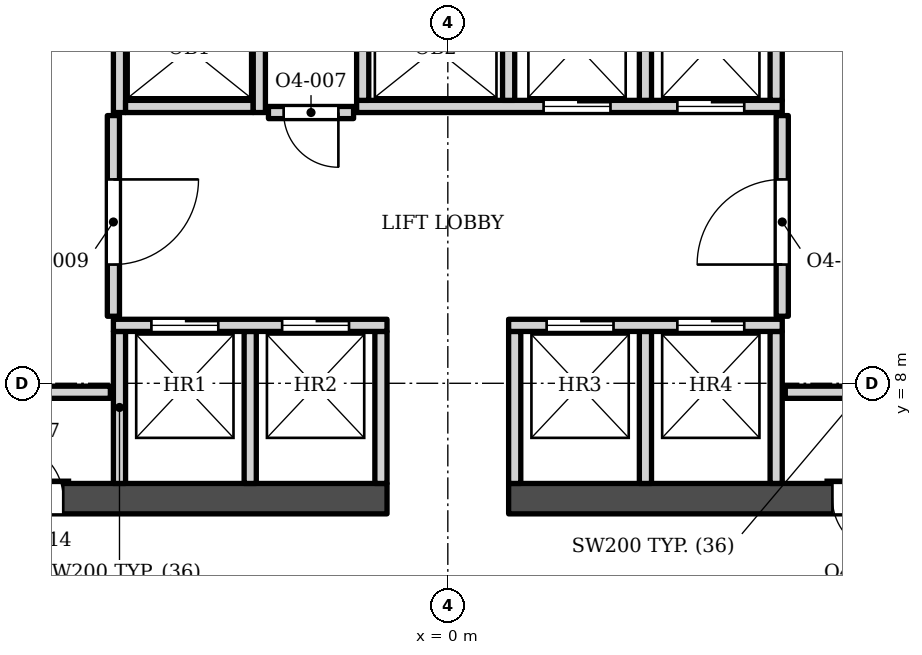
"""IFC4 building model, lengths in metres.
Left out: names, types, materials, properties, quantities, classifications, styles, units other than length and angle.
Written with IfcOpenShell. Run it as: python <this file> out.ifc"""

import sys

from ifc_helpers import new_model, si_unit, direction, frame, frame_2d, origin, place, context, subcontext, project, spatial, rectangle, extrude, element, fill, save


model = new_model("IFC4")
c1 = context("Model", 3, precision=1e-05, world=origin(), true_north=direction((0.0, 1.0)))
c2 = subcontext(c1, "Body", "Model", "MODEL_VIEW")
j1 = project(units=[si_unit("LENGTHUNIT", "METRE"), si_unit("PLANEANGLEUNIT", "RADIAN")], contexts=[c1])
p1 = place(None, origin())
s1 = spatial("IfcSite", under=j1, at=p1, CompositionType="ELEMENT")
p2 = place(p1, origin())
s2 = spatial("IfcBuilding", under=s1, at=p2, CompositionType="ELEMENT")
p3 = place(p2, frame((0.0, 0.0, 179.7)))
s3 = spatial("IfcBuildingStorey", under=s2, at=p3, CompositionType="ELEMENT", Elevation=179.7)
p4 = place(p3, frame((-8.05, 6.103, 0.0), z_axis=(0.0, 0.0, 1.0), x_axis=(1.0, 0.0, 0.0)))
e1 = element("IfcWall", 1, at=p4, inside=s3, PredefinedType="SHEAR", context=c2, shape_type="SweptSolid", body=[
    extrude(rectangle(XDim=7.05, YDim=0.5, at=frame_2d((3.525, 0.0))), origin(), (0.0, 0.0, 1.0), 3.9),
])
p5 = place(p4, frame((0.825, 0.0, 0.0)))
e2 = element("IfcOpeningElement", 2, at=p5, cuts=e1, PredefinedType="OPENING", context=c2, shape_type="SweptSolid", body=[
    extrude(rectangle(XDim=0.9, YDim=2.1, at=frame_2d((0.45, 1.05))), frame((0.0, 0.26, 0.0), z_axis=(0.0, -1.0, 0.0), x_axis=(1.0, 0.0, 0.0)), (0.0, 0.0, 1.0), 0.52),
])
p6 = place(p3, frame((1.0, 6.103, 0.0), z_axis=(0.0, 0.0, 1.0), x_axis=(1.0, 0.0, 0.0)))
e3 = element("IfcWall", 3, at=p6, inside=s3, PredefinedType="SHEAR", context=c2, shape_type="SweptSolid", body=[
    extrude(rectangle(XDim=7.05, YDim=0.5, at=frame_2d((3.525, 0.0))), origin(), (0.0, 0.0, 1.0), 3.9),
])
p7 = place(p6, frame((5.325, 0.0, 0.0)))
e4 = element("IfcOpeningElement", 4, at=p7, cuts=e3, PredefinedType="OPENING", context=c2, shape_type="SweptSolid", body=[
    extrude(rectangle(XDim=0.9, YDim=2.1, at=frame_2d((0.45, 1.05))), frame((0.0, 0.26, 0.0), z_axis=(0.0, -1.0, 0.0), x_axis=(1.0, 0.0, 0.0)), (0.0, 0.0, 1.0), 0.52),
])
for number, where, z_axis, x_axis in (
    (5, (-5.4, 6.353, 0.0), (0.0, 0.0, 1.0), (0.0, 1.0, 0.0)),
    (6, (-3.25, 6.353, 0.0), (0.0, 0.0, 1.0), (0.0, 1.0, 0.0)),
    (7, (-1.1, 6.353, 0.0), (0.0, 0.0, 1.0), (0.0, 1.0, 0.0)),
    (8, (1.1, 6.353, 0.0), (0.0, 0.0, 1.0), (0.0, 1.0, 0.0)),
    (9, (3.25, 6.353, 0.0), (0.0, 0.0, 1.0), (0.0, 1.0, 0.0)),
    (10, (5.4, 6.353, 0.0), (0.0, 0.0, 1.0), (0.0, 1.0, 0.0)),
    (11, (-8.05, 7.853, 0.0), (0.0, 0.0, 1.0), (1.0, 0.0, 0.0)),
    (12, (5.55, 7.853, 0.0), (0.0, 0.0, 1.0), (1.0, 0.0, 0.0)),
):
    element("IfcWall", number, at=place(p3, frame(where, z_axis=z_axis, x_axis=x_axis)), inside=s3, PredefinedType="SOLIDWALL", context=c2, shape_type="SweptSolid", body=[
        extrude(rectangle(XDim=2.5, YDim=0.2, at=frame_2d((1.25, 0.0))), origin(), (0.0, 0.0, 1.0), 3.73),
    ])
p8 = place(p3, frame((-5.5, 8.953, 0.0), z_axis=(0.0, 0.0, 1.0), x_axis=(1.0, 0.0, 0.0)))
e13 = element("IfcWall", 13, at=p8, inside=s3, PredefinedType="SOLIDWALL", context=c2, shape_type="SweptSolid", body=[
    extrude(rectangle(XDim=4.5, YDim=0.2, at=frame_2d((2.25, 0.0))), origin(), (0.0, 0.0, 1.0), 3.73),
])
p9 = place(p8, frame((0.625, 0.0, 0.0)))
e14 = element("IfcOpeningElement", 14, at=p9, cuts=e13, PredefinedType="OPENING", context=c2, shape_type="SweptSolid", body=[
    extrude(rectangle(XDim=1.1, YDim=2.1, at=frame_2d((0.55, 1.05))), frame((0.0, 0.11, 0.0), z_axis=(0.0, -1.0, 0.0), x_axis=(1.0, 0.0, 0.0)), (0.0, 0.0, 1.0), 0.22),
])
p10 = place(p8, frame((2.775, 0.0, 0.0)))
e15 = element("IfcOpeningElement", 15, at=p10, cuts=e13, PredefinedType="OPENING", context=c2, shape_type="SweptSolid", body=[
    extrude(rectangle(XDim=1.1, YDim=2.1, at=frame_2d((0.55, 1.05))), frame((0.0, 0.11, 0.0), z_axis=(0.0, -1.0, 0.0), x_axis=(1.0, 0.0, 0.0)), (0.0, 0.0, 1.0), 0.22),
])
p11 = place(p3, frame((1.0, 8.953, 0.0), z_axis=(0.0, 0.0, 1.0), x_axis=(1.0, 0.0, 0.0)))
e16 = element("IfcWall", 16, at=p11, inside=s3, PredefinedType="SOLIDWALL", context=c2, shape_type="SweptSolid", body=[
    extrude(rectangle(XDim=4.5, YDim=0.2, at=frame_2d((2.25, 0.0))), origin(), (0.0, 0.0, 1.0), 3.73),
])
p12 = place(p11, frame((0.625, 0.0, 0.0)))
e17 = element("IfcOpeningElement", 17, at=p12, cuts=e16, PredefinedType="OPENING", context=c2, shape_type="SweptSolid", body=[
    extrude(rectangle(XDim=1.1, YDim=2.1, at=frame_2d((0.55, 1.05))), frame((0.0, 0.11, 0.0), z_axis=(0.0, -1.0, 0.0), x_axis=(1.0, 0.0, 0.0)), (0.0, 0.0, 1.0), 0.22),
])
p13 = place(p11, frame((2.775, 0.0, 0.0)))
e18 = element("IfcOpeningElement", 18, at=p13, cuts=e16, PredefinedType="OPENING", context=c2, shape_type="SweptSolid", body=[
    extrude(rectangle(XDim=1.1, YDim=2.1, at=frame_2d((0.55, 1.05))), frame((0.0, 0.11, 0.0), z_axis=(0.0, -1.0, 0.0), x_axis=(1.0, 0.0, 0.0)), (0.0, 0.0, 1.0), 0.22),
])
p14 = place(p3, frame((-5.5, 9.103, 0.0), z_axis=(0.0, 0.0, 1.0), x_axis=(0.0, 1.0, 0.0)))
e19 = element("IfcWall", 19, at=p14, inside=s3, PredefinedType="SOLIDWALL", context=c2, shape_type="SweptSolid", body=[
    extrude(rectangle(XDim=3.3, YDim=0.2, at=frame_2d((1.65, 0.0))), origin(), (0.0, 0.0, 1.0), 3.73),
])
p15 = place(p14, frame((0.85, 0.0, 0.0)))
e20 = element("IfcOpeningElement", 20, at=p15, cuts=e19, PredefinedType="OPENING", context=c2, shape_type="SweptSolid", body=[
    extrude(rectangle(XDim=1.4, YDim=2.1, at=frame_2d((0.7, 1.05))), frame((0.0, 0.11, 0.0), z_axis=(0.0, -1.0, 0.0), x_axis=(1.0, 0.0, 0.0)), (0.0, 0.0, 1.0), 0.22),
])
p16 = place(p3, frame((5.5, 9.103, 0.0), z_axis=(0.0, 0.0, 1.0), x_axis=(0.0, 1.0, 0.0)))
e21 = element("IfcWall", 21, at=p16, inside=s3, PredefinedType="SOLIDWALL", context=c2, shape_type="SweptSolid", body=[
    extrude(rectangle(XDim=3.3, YDim=0.2, at=frame_2d((1.65, 0.0))), origin(), (0.0, 0.0, 1.0), 3.73),
])
p17 = place(p16, frame((0.85, 0.0, 0.0)))
e22 = element("IfcOpeningElement", 22, at=p17, cuts=e21, PredefinedType="OPENING", context=c2, shape_type="SweptSolid", body=[
    extrude(rectangle(XDim=1.4, YDim=2.1, at=frame_2d((0.7, 1.05))), frame((0.0, 0.11, 0.0), z_axis=(0.0, -1.0, 0.0), x_axis=(1.0, 0.0, 0.0)), (0.0, 0.0, 1.0), 0.22),
])
p18 = place(p3, frame((-2.95, 12.453, 0.0), z_axis=(0.0, 0.0, 1.0), x_axis=(1.0, 0.0, 0.0)))
e23 = element("IfcWall", 23, at=p18, inside=s3, PredefinedType="SOLIDWALL", context=c2, shape_type="SweptSolid", body=[
    extrude(rectangle(XDim=1.4, YDim=0.2, at=frame_2d((0.7, 0.0))), origin(), (0.0, 0.0, 1.0), 3.73),
])
p19 = place(p18, frame((0.25, 0.0, 0.0)))
e24 = element("IfcOpeningElement", 24, at=p19, cuts=e23, PredefinedType="OPENING", context=c2, shape_type="SweptSolid", body=[
    extrude(rectangle(XDim=0.9, YDim=2.1, at=frame_2d((0.45, 1.05))), frame((0.0, 0.11, 0.0), z_axis=(0.0, -1.0, 0.0), x_axis=(1.0, 0.0, 0.0)), (0.0, 0.0, 1.0), 0.22),
])
p20 = place(p3, frame((-5.4, 12.453, 0.0), z_axis=(0.0, 0.0, 1.0), x_axis=(0.0, 1.0, 0.0)))
e25 = element("IfcWall", 25, at=p20, inside=s3, PredefinedType="SOLIDWALL", context=c2, shape_type="SweptSolid", body=[
    extrude(rectangle(XDim=3.0, YDim=0.2, at=frame_2d((1.5, 0.0))), origin(), (0.0, 0.0, 1.0), 3.73),
])
p21 = place(p3, frame((-5.3, 12.552, 0.0), z_axis=(0.0, 0.0, 1.0), x_axis=(1.0, 0.0, 0.0)))
e26 = element("IfcWall", 26, at=p21, inside=s3, PredefinedType="SOLIDWALL", context=c2, shape_type="SweptSolid", body=[
    extrude(rectangle(XDim=2.1, YDim=0.2, at=frame_2d((1.05, 0.0))), origin(), (0.0, 0.0, 1.0), 3.73),
])
p22 = place(p3, frame((-3.1, 12.453, 0.0), z_axis=(0.0, 0.0, 1.0), x_axis=(0.0, 1.0, 0.0)))
e27 = element("IfcWall", 27, at=p22, inside=s3, PredefinedType="SOLIDWALL", context=c2, shape_type="SweptSolid", body=[
    extrude(rectangle(XDim=3.0, YDim=0.2, at=frame_2d((1.5, 0.0))), origin(), (0.0, 0.0, 1.0), 3.73),
])
p23 = place(p3, frame((-1.5, 12.552, 0.0), z_axis=(0.0, 0.0, 1.0), x_axis=(1.0, 0.0, 0.0)))
e28 = element("IfcWall", 28, at=p23, inside=s3, PredefinedType="SOLIDWALL", context=c2, shape_type="SweptSolid", body=[
    extrude(rectangle(XDim=7.0, YDim=0.2, at=frame_2d((3.5, 0.0))), origin(), (0.0, 0.0, 1.0), 3.73),
])
p24 = place(p23, frame((3.075, 0.0, 0.0)))
e29 = element("IfcOpeningElement", 29, at=p24, cuts=e28, PredefinedType="OPENING", context=c2, shape_type="SweptSolid", body=[
    extrude(rectangle(XDim=1.1, YDim=2.1, at=frame_2d((0.55, 1.05))), frame((0.0, 0.11, 0.0), z_axis=(0.0, -1.0, 0.0), x_axis=(1.0, 0.0, 0.0)), (0.0, 0.0, 1.0), 0.22),
])
p25 = place(p23, frame((5.275, 0.0, 0.0)))
e30 = element("IfcOpeningElement", 30, at=p25, cuts=e28, PredefinedType="OPENING", context=c2, shape_type="SweptSolid", body=[
    extrude(rectangle(XDim=1.1, YDim=2.1, at=frame_2d((0.55, 1.05))), frame((0.0, 0.11, 0.0), z_axis=(0.0, -1.0, 0.0), x_axis=(1.0, 0.0, 0.0)), (0.0, 0.0, 1.0), 0.22),
])
for number, where, z_axis, x_axis in (
    (31, (-1.4, 12.653, 0.0), (0.0, 0.0, 1.0), (0.0, 1.0, 0.0)),
    (32, (1.0, 12.653, 0.0), (0.0, 0.0, 1.0), (0.0, 1.0, 0.0)),
    (33, (3.25, 12.653, 0.0), (0.0, 0.0, 1.0), (0.0, 1.0, 0.0)),
):
    element("IfcWall", number, at=place(p3, frame(where, z_axis=z_axis, x_axis=x_axis)), inside=s3, PredefinedType="SOLIDWALL", context=c2, shape_type="SweptSolid", body=[
        extrude(rectangle(XDim=2.6, YDim=0.2, at=frame_2d((1.3, 0.0))), origin(), (0.0, 0.0, 1.0), 3.73),
    ])
p26 = place(p3, frame((5.4, 12.653, 0.0), z_axis=(0.0, 0.0, 1.0), x_axis=(0.0, 1.0, 0.0)))
e34 = element("IfcWall", 34, at=p26, inside=s3, PredefinedType="SOLIDWALL", context=c2, shape_type="SweptSolid", body=[
    extrude(rectangle(XDim=1.6, YDim=0.2, at=frame_2d((0.8, 0.0))), origin(), (0.0, 0.0, 1.0), 3.73),
])
p27 = place(p9, origin())
e35 = element("IfcDoor", 35, at=p27, inside=s3, OperationType="DOUBLE_DOOR_SLIDING", PredefinedType="DOOR", context=c2, shape_type="SweptSolid", body=[
    extrude(rectangle(XDim=1.1, YDim=2.1, at=frame_2d((0.55, 1.05))), frame((0.0, 0.025, 0.0), z_axis=(0.0, -1.0, 0.0), x_axis=(1.0, 0.0, 0.0)), (0.0, 0.0, 1.0), 0.05),
])
fill(e14, e35)
p28 = place(p10, origin())
e36 = element("IfcDoor", 36, at=p28, inside=s3, OperationType="DOUBLE_DOOR_SLIDING", PredefinedType="DOOR", context=c2, shape_type="SweptSolid", body=[
    extrude(rectangle(XDim=1.1, YDim=2.1, at=frame_2d((0.55, 1.05))), frame((0.0, 0.025, 0.0), z_axis=(0.0, -1.0, 0.0), x_axis=(1.0, 0.0, 0.0)), (0.0, 0.0, 1.0), 0.05),
])
fill(e15, e36)
p29 = place(p12, origin())
e37 = element("IfcDoor", 37, at=p29, inside=s3, OperationType="DOUBLE_DOOR_SLIDING", PredefinedType="DOOR", context=c2, shape_type="SweptSolid", body=[
    extrude(rectangle(XDim=1.1, YDim=2.1, at=frame_2d((0.55, 1.05))), frame((0.0, 0.025, 0.0), z_axis=(0.0, -1.0, 0.0), x_axis=(1.0, 0.0, 0.0)), (0.0, 0.0, 1.0), 0.05),
])
fill(e17, e37)
p30 = place(p13, origin())
e38 = element("IfcDoor", 38, at=p30, inside=s3, OperationType="DOUBLE_DOOR_SLIDING", PredefinedType="DOOR", context=c2, shape_type="SweptSolid", body=[
    extrude(rectangle(XDim=1.1, YDim=2.1, at=frame_2d((0.55, 1.05))), frame((0.0, 0.025, 0.0), z_axis=(0.0, -1.0, 0.0), x_axis=(1.0, 0.0, 0.0)), (0.0, 0.0, 1.0), 0.05),
])
fill(e18, e38)
p31 = place(p24, origin())
e39 = element("IfcDoor", 39, at=p31, inside=s3, OperationType="DOUBLE_DOOR_SLIDING", PredefinedType="DOOR", context=c2, shape_type="SweptSolid", body=[
    extrude(rectangle(XDim=1.1, YDim=2.1, at=frame_2d((0.55, 1.05))), frame((0.0, 0.025, 0.0), z_axis=(0.0, -1.0, 0.0), x_axis=(1.0, 0.0, 0.0)), (0.0, 0.0, 1.0), 0.05),
])
fill(e29, e39)
p32 = place(p25, origin())
e40 = element("IfcDoor", 40, at=p32, inside=s3, OperationType="DOUBLE_DOOR_SLIDING", PredefinedType="DOOR", context=c2, shape_type="SweptSolid", body=[
    extrude(rectangle(XDim=1.1, YDim=2.1, at=frame_2d((0.55, 1.05))), frame((0.0, 0.025, 0.0), z_axis=(0.0, -1.0, 0.0), x_axis=(1.0, 0.0, 0.0)), (0.0, 0.0, 1.0), 0.05),
])
fill(e30, e40)
p33 = place(p19, origin())
e41 = element("IfcDoor", 41, at=p33, inside=s3, OperationType="SINGLE_SWING_RIGHT", PredefinedType="DOOR", context=c2, shape_type="SweptSolid", body=[
    extrude(rectangle(XDim=0.9, YDim=2.1, at=frame_2d((0.45, 1.05))), frame((0.0, 0.025, 0.0), z_axis=(0.0, -1.0, 0.0), x_axis=(1.0, 0.0, 0.0)), (0.0, 0.0, 1.0), 0.05),
])
fill(e24, e41)
p34 = place(p15, origin())
e42 = element("IfcDoor", 42, at=p34, inside=s3, OperationType="SINGLE_SWING_RIGHT", PredefinedType="DOOR", context=c2, shape_type="SweptSolid", body=[
    extrude(rectangle(XDim=1.4, YDim=2.1, at=frame_2d((0.7, 1.05))), frame((0.0, 0.025, 0.0), z_axis=(0.0, -1.0, 0.0), x_axis=(1.0, 0.0, 0.0)), (0.0, 0.0, 1.0), 0.05),
])
fill(e20, e42)
p35 = place(p17, origin())
e43 = element("IfcDoor", 43, at=p35, inside=s3, OperationType="SINGLE_SWING_LEFT", PredefinedType="DOOR", context=c2, shape_type="SweptSolid", body=[
    extrude(rectangle(XDim=1.4, YDim=2.1, at=frame_2d((0.7, 1.05))), frame((0.0, 0.025, 0.0), z_axis=(0.0, -1.0, 0.0), x_axis=(1.0, 0.0, 0.0)), (0.0, 0.0, 1.0), 0.05),
])
fill(e22, e43)
p36 = place(p5, origin())
e44 = element("IfcDoor", 44, at=p36, inside=s3, OperationType="SINGLE_SWING_LEFT", PredefinedType="DOOR", context=c2, shape_type="SweptSolid", body=[
    extrude(rectangle(XDim=0.9, YDim=2.1, at=frame_2d((0.45, 1.05))), frame((0.0, 0.025, 0.0), z_axis=(0.0, -1.0, 0.0), x_axis=(1.0, 0.0, 0.0)), (0.0, 0.0, 1.0), 0.05),
])
fill(e2, e44)
p37 = place(p7, origin())
e45 = element("IfcDoor", 45, at=p37, inside=s3, OperationType="SINGLE_SWING_RIGHT", PredefinedType="DOOR", context=c2, shape_type="SweptSolid", body=[
    extrude(rectangle(XDim=0.9, YDim=2.1, at=frame_2d((0.45, 1.05))), frame((0.0, 0.025, 0.0), z_axis=(0.0, -1.0, 0.0), x_axis=(1.0, 0.0, 0.0)), (0.0, 0.0, 1.0), 0.05),
])
fill(e4, e45)
save(model, sys.argv[1])
